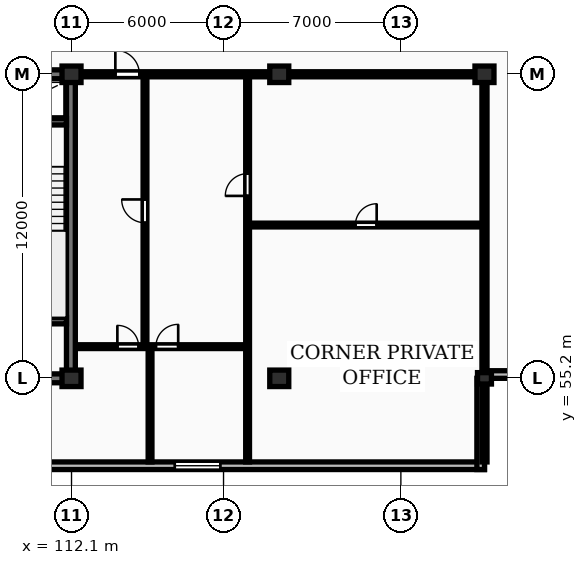
"""IFC4 building model, lengths in metres.
Left out: names, types, materials, properties, quantities, classifications, styles, units other than length and angle.
Written with IfcOpenShell. Run it as: python <this file> out.ifc"""

import sys

from ifc_helpers import new_model, si_unit, direction, frame, frame_2d, origin, origin_2d, place, context, subcontext, project, spatial, rectangle, extrude, element, fill, save


model = new_model("IFC4")
c1 = context("Model", 3, precision=1e-05, world=origin(), true_north=direction((0.0, 1.0)))
c2 = subcontext(c1, "Body", "Model", "MODEL_VIEW")
j1 = project(units=[si_unit("LENGTHUNIT", "METRE"), si_unit("PLANEANGLEUNIT", "RADIAN")], contexts=[c1])
p1 = place(None, origin())
s1 = spatial("IfcSite", under=j1, at=p1, CompositionType="ELEMENT")
p2 = place(p1, origin())
s2 = spatial("IfcBuilding", under=s1, at=p2, CompositionType="ELEMENT")
p3 = place(p2, frame((0.0, 0.0, 242.45)))
s3 = spatial("IfcBuildingStorey", under=s2, at=p3, CompositionType="ELEMENT", Elevation=242.45)
for number, where, z_axis, x_axis in (
    (1, (112.1, 55.2, 0.0), (0.0, 0.0, 1.0), (1.0, 0.0, 0.0)),
    (2, (112.1, 67.2, 0.0), (0.0, 0.0, 1.0), (1.0, 0.0, 0.0)),
    (3, (120.3, 55.2, 0.0), (0.0, 0.0, 1.0), (1.0, 0.0, 0.0)),
    (4, (120.3, 67.2, 0.0), (0.0, 0.0, 1.0), (1.0, 0.0, 0.0)),
):
    element("IfcColumn", number, at=place(p3, frame(where, z_axis=z_axis, x_axis=x_axis)), inside=s3, PredefinedType="COLUMN", context=c2, shape_type="SweptSolid", body=[
        extrude(rectangle(XDim=0.75, YDim=0.65, at=origin_2d()), origin(), (0.0, 0.0, 1.0), 3.45),
    ])
p4 = place(p3, frame((128.4, 55.2, 0.0), z_axis=(0.0, 0.0, 1.0), x_axis=(1.0, 0.0, 0.0)))
e5 = element("IfcColumn", 5, at=p4, inside=s3, PredefinedType="PILASTER", context=c2, shape_type="SweptSolid", body=[
    extrude(rectangle(XDim=0.55, YDim=0.45, at=origin_2d()), origin(), (0.0, 0.0, 1.0), 3.45),
])
p5 = place(p3, frame((128.4, 67.2, 0.0), z_axis=(0.0, 0.0, 1.0), x_axis=(1.0, 0.0, 0.0)))
e6 = element("IfcColumn", 6, at=p5, inside=s3, PredefinedType="COLUMN", context=c2, shape_type="SweptSolid", body=[
    extrude(rectangle(XDim=0.75, YDim=0.65, at=origin_2d()), origin(), (0.0, 0.0, 1.0), 3.45),
])
p6 = place(p3, frame((59.8, 51.75, 0.0), z_axis=(0.0, 0.0, 1.0), x_axis=(1.0, 0.0, 0.0)))
e7 = element("IfcWall", 7, at=p6, inside=s3, PredefinedType="STANDARD", context=c2, shape_type="SweptSolid", body=[
    extrude(rectangle(XDim=68.6, YDim=0.3, at=frame_2d((34.3, 0.0))), origin(), (0.0, 0.0, 1.0), 3.17),
])
p7 = place(p6, frame((13.025, 0.0, 0.85)))
e8 = element("IfcOpeningElement", 8, at=p7, cuts=e7, PredefinedType="OPENING", context=c2, shape_type="SweptSolid", body=[
    extrude(rectangle(XDim=1.8, YDim=1.8, at=frame_2d((0.9, 0.9))), frame((0.0, 0.16, 0.0), z_axis=(0.0, -1.0, 0.0), x_axis=(1.0, 0.0, 0.0)), (0.0, 0.0, 1.0), 0.32),
])
p8 = place(p6, frame((56.375, 0.0, 0.85)))
e9 = element("IfcOpeningElement", 9, at=p8, cuts=e7, PredefinedType="OPENING", context=c2, shape_type="SweptSolid", body=[
    extrude(rectangle(XDim=1.8, YDim=1.8, at=frame_2d((0.9, 0.9))), frame((0.0, 0.16, 0.0), z_axis=(0.0, -1.0, 0.0), x_axis=(1.0, 0.0, 0.0)), (0.0, 0.0, 1.0), 0.32),
])
p9 = place(p3, frame((128.25, 51.6, 0.0), z_axis=(0.0, 0.0, 1.0), x_axis=(0.0, 1.0, 0.0)))
e10 = element("IfcWall", 10, at=p9, inside=s3, PredefinedType="STANDARD", context=c2, shape_type="SweptSolid", body=[
    extrude(rectangle(XDim=3.6, YDim=0.3, at=frame_2d((1.8, 0.0))), origin(), (0.0, 0.0, 1.0), 3.17),
])
p10 = place(p3, frame((128.4, 55.35, 0.0), z_axis=(0.0, 0.0, 1.0), x_axis=(1.0, 0.0, 0.0)))
e11 = element("IfcWall", 11, at=p10, inside=s3, PredefinedType="STANDARD", context=c2, shape_type="SweptSolid", body=[
    extrude(rectangle(XDim=3.6, YDim=0.3, at=frame_2d((1.8, 0.0))), origin(), (0.0, 0.0, 1.0), 3.17),
])
p11 = place(p3, frame((75.95, 55.2, 0.0), z_axis=(0.0, 0.0, 1.0), x_axis=(1.0, 0.0, 0.0)))
e12 = element("IfcWall", 12, at=p11, inside=s3, PredefinedType="SHEAR", context=c2, shape_type="SweptSolid", body=[
    extrude(rectangle(XDim=36.3, YDim=0.35, at=frame_2d((18.15, 0.0))), origin(), (0.0, 0.0, 1.0), 3.45),
])
p12 = place(p3, frame((112.075, 55.375, 0.0), z_axis=(0.0, 0.0, 1.0), x_axis=(0.0, 1.0, 0.0)))
e13 = element("IfcWall", 13, at=p12, inside=s3, PredefinedType="SHEAR", context=c2, shape_type="SweptSolid", body=[
    extrude(rectangle(XDim=11.65, YDim=0.35, at=frame_2d((5.825, 0.0))), origin(), (0.0, 0.0, 1.0), 3.45),
])
p13 = place(p3, frame((75.95, 67.2, 0.0), z_axis=(0.0, 0.0, 1.0), x_axis=(1.0, 0.0, 0.0)))
e14 = element("IfcWall", 14, at=p13, inside=s3, PredefinedType="SHEAR", context=c2, shape_type="SweptSolid", body=[
    extrude(rectangle(XDim=36.3, YDim=0.35, at=frame_2d((18.15, 0.0))), origin(), (0.0, 0.0, 1.0), 3.45),
])
p14 = place(p13, frame((5.25, 0.0, 0.0)))
e15 = element("IfcOpeningElement", 15, at=p14, cuts=e14, PredefinedType="OPENING", context=c2, shape_type="SweptSolid", body=[
    extrude(rectangle(XDim=1.0, YDim=2.15, at=frame_2d((0.5, 1.075))), frame((0.0, 0.185, 0.0), z_axis=(0.0, -1.0, 0.0), x_axis=(1.0, 0.0, 0.0)), (0.0, 0.0, 1.0), 0.37),
])
p15 = place(p13, frame((21.6, 0.0, 0.0)))
e16 = element("IfcOpeningElement", 16, at=p15, cuts=e14, PredefinedType="OPENING", context=c2, shape_type="SweptSolid", body=[
    extrude(rectangle(XDim=1.5, YDim=2.2, at=frame_2d((0.75, 1.1))), frame((0.0, 0.185, 0.0), z_axis=(0.0, -1.0, 0.0), x_axis=(1.0, 0.0, 0.0)), (0.0, 0.0, 1.0), 0.37),
])
p16 = place(p13, frame((30.45, 0.0, 0.0)))
e17 = element("IfcOpeningElement", 17, at=p16, cuts=e14, PredefinedType="OPENING", context=c2, shape_type="SweptSolid", body=[
    extrude(rectangle(XDim=1.0, YDim=2.15, at=frame_2d((0.5, 1.075))), frame((0.0, 0.185, 0.0), z_axis=(0.0, -1.0, 0.0), x_axis=(1.0, 0.0, 0.0)), (0.0, 0.0, 1.0), 0.37),
])
for number, where, z_axis, x_axis in (
    (18, (108.66, 57.475, 0.0), (0.0, 0.0, 1.0), (1.0, 0.0, 0.0)),
    (19, (108.66, 65.325, 0.0), (0.0, 0.0, 1.0), (1.0, 0.0, 0.0)),
):
    element("IfcWall", number, at=place(p3, frame(where, z_axis=z_axis, x_axis=x_axis)), inside=s3, PredefinedType="SHEAR", context=c2, shape_type="SweptSolid", body=[
        extrude(rectangle(XDim=3.24, YDim=0.25, at=frame_2d((1.62, 0.0))), origin(), (0.0, 0.0, 1.0), 3.45),
    ])
p17 = place(p3, frame((128.4, 51.9, 0.0), z_axis=(0.0, 0.0, 1.0), x_axis=(0.0, 1.0, 0.0)))
e20 = element("IfcWall", 20, at=p17, inside=s3, PredefinedType="PARTITIONING", context=c2, shape_type="SweptSolid", body=[
    extrude(rectangle(XDim=15.3, YDim=0.2, at=frame_2d((7.65, 0.0))), origin(), (0.0, 0.0, 1.0), 2.477),
])
p18 = place(p3, frame((119.05, 61.25, 0.0), z_axis=(0.0, 0.0, 1.0), x_axis=(1.0, 0.0, 0.0)))
e21 = element("IfcWall", 21, at=p18, inside=s3, PredefinedType="PARTITIONING", context=c2, shape_type="SweptSolid", body=[
    extrude(rectangle(XDim=9.35, YDim=0.15, at=frame_2d((4.675, 0.0))), origin(), (0.0, 0.0, 1.0), 3.17),
])
p19 = place(p18, frame((4.255, 0.0, 0.0)))
e22 = element("IfcOpeningElement", 22, at=p19, cuts=e21, PredefinedType="OPENING", context=c2, shape_type="SweptSolid", body=[
    extrude(rectangle(XDim=0.84, YDim=2.04, at=frame_2d((0.42, 1.02))), frame((0.0, 0.085, 0.0), z_axis=(0.0, -1.0, 0.0), x_axis=(1.0, 0.0, 0.0)), (0.0, 0.0, 1.0), 0.17),
])
p20 = place(p3, frame((119.05, 51.9, 0.0), z_axis=(0.0, 0.0, 1.0), x_axis=(0.0, 1.0, 0.0)))
e23 = element("IfcWall", 23, at=p20, inside=s3, PredefinedType="PARTITIONING", context=c2, shape_type="SweptSolid", body=[
    extrude(rectangle(XDim=15.25, YDim=0.15, at=frame_2d((7.625, 0.0))), origin(), (0.0, 0.0, 1.0), 3.17),
])
p21 = place(p20, frame((10.5, 0.0, 0.0)))
e24 = element("IfcOpeningElement", 24, at=p21, cuts=e23, PredefinedType="OPENING", context=c2, shape_type="SweptSolid", body=[
    extrude(rectangle(XDim=0.88, YDim=2.06, at=frame_2d((0.44, 1.03))), frame((0.0, 0.085, 0.0), z_axis=(0.0, -1.0, 0.0), x_axis=(1.0, 0.0, 0.0)), (0.0, 0.0, 1.0), 0.17),
])
p22 = place(p3, frame((115.0, 56.45, 0.0), z_axis=(0.0, 0.0, 1.0), x_axis=(0.0, 1.0, 0.0)))
e25 = element("IfcWall", 25, at=p22, inside=s3, PredefinedType="PARTITIONING", context=c2, shape_type="SweptSolid", body=[
    extrude(rectangle(XDim=10.7, YDim=0.15, at=frame_2d((5.35, 0.0))), origin(), (0.0, 0.0, 1.0), 3.17),
])
p23 = place(p22, frame((4.89, 0.0, 0.0)))
e26 = element("IfcOpeningElement", 26, at=p23, cuts=e25, PredefinedType="OPENING", context=c2, shape_type="SweptSolid", body=[
    extrude(rectangle(XDim=0.92, YDim=2.08, at=frame_2d((0.46, 1.04))), frame((0.0, 0.085, 0.0), z_axis=(0.0, -1.0, 0.0), x_axis=(1.0, 0.0, 0.0)), (0.0, 0.0, 1.0), 0.17),
])
p24 = place(p3, frame((115.2, 51.9, 0.0), z_axis=(0.0, 0.0, 1.0), x_axis=(0.0, 1.0, 0.0)))
e27 = element("IfcWall", 27, at=p24, inside=s3, PredefinedType="PARTITIONING", context=c2, shape_type="SweptSolid", body=[
    extrude(rectangle(XDim=4.55, YDim=0.15, at=frame_2d((2.275, 0.0))), origin(), (0.0, 0.0, 1.0), 3.17),
])
p25 = place(p3, frame((112.27, 56.45, 0.0), z_axis=(0.0, 0.0, 1.0), x_axis=(1.0, 0.0, 0.0)))
e28 = element("IfcWall", 28, at=p25, inside=s3, PredefinedType="PARTITIONING", context=c2, shape_type="SweptSolid", body=[
    extrude(rectangle(XDim=6.76, YDim=0.15, at=frame_2d((3.38, 0.0))), origin(), (0.0, 0.0, 1.0), 3.17),
])
p26 = place(p25, frame((1.64, 0.0, 0.0)))
e29 = element("IfcOpeningElement", 29, at=p26, cuts=e28, PredefinedType="OPENING", context=c2, shape_type="SweptSolid", body=[
    extrude(rectangle(XDim=0.84, YDim=2.04, at=frame_2d((0.42, 1.02))), frame((0.0, 0.085, 0.0), z_axis=(0.0, -1.0, 0.0), x_axis=(1.0, 0.0, 0.0)), (0.0, 0.0, 1.0), 0.17),
])
p27 = place(p25, frame((3.16, 0.0, 0.0)))
e30 = element("IfcOpeningElement", 30, at=p27, cuts=e28, PredefinedType="OPENING", context=c2, shape_type="SweptSolid", body=[
    extrude(rectangle(XDim=0.88, YDim=2.06, at=frame_2d((0.44, 1.03))), frame((0.0, 0.085, 0.0), z_axis=(0.0, -1.0, 0.0), x_axis=(1.0, 0.0, 0.0)), (0.0, 0.0, 1.0), 0.17),
])
p28 = place(p3, frame((112.25, 67.2, 0.0), z_axis=(0.0, 0.0, 1.0), x_axis=(1.0, 0.0, 0.0)))
e31 = element("IfcWall", 31, at=p28, inside=s3, PredefinedType="PARTITIONING", context=c2, shape_type="SweptSolid", body=[
    extrude(rectangle(XDim=16.15, YDim=0.2, at=frame_2d((8.075, 0.0))), origin(), (0.0, 0.0, 1.0), 2.633),
])
p29 = place(p28, frame((1.58, 0.0, 0.0)))
e32 = element("IfcOpeningElement", 32, at=p29, cuts=e31, PredefinedType="OPENING", context=c2, shape_type="SweptSolid", body=[
    extrude(rectangle(XDim=0.95, YDim=2.15, at=frame_2d((0.475, 1.075))), frame((0.0, 0.11, 0.0), z_axis=(0.0, -1.0, 0.0), x_axis=(1.0, 0.0, 0.0)), (0.0, 0.0, 1.0), 0.22),
])
p30 = place(p8, origin())
e33 = element("IfcWindow", 33, at=p30, inside=s3, PartitioningType="SINGLE_PANEL", PredefinedType="WINDOW", context=c2, shape_type="SweptSolid", body=[
    extrude(rectangle(XDim=1.8, YDim=1.8, at=frame_2d((0.9, 0.9))), frame((0.0, 0.03, 0.0), z_axis=(0.0, -1.0, 0.0), x_axis=(1.0, 0.0, 0.0)), (0.0, 0.0, 1.0), 0.06),
])
fill(e9, e33)
p31 = place(p19, origin())
e34 = element("IfcDoor", 34, at=p31, inside=s3, OperationType="SINGLE_SWING_RIGHT", PredefinedType="DOOR", context=c2, shape_type="SweptSolid", body=[
    extrude(rectangle(XDim=0.84, YDim=2.04, at=frame_2d((0.42, 1.02))), frame((0.0, 0.025, 0.0), z_axis=(0.0, -1.0, 0.0), x_axis=(1.0, 0.0, 0.0)), (0.0, 0.0, 1.0), 0.05),
])
fill(e22, e34)
p32 = place(p21, origin())
e35 = element("IfcDoor", 35, at=p32, inside=s3, OperationType="SINGLE_SWING_LEFT", PredefinedType="DOOR", context=c2, shape_type="SweptSolid", body=[
    extrude(rectangle(XDim=0.88, YDim=2.06, at=frame_2d((0.44, 1.03))), frame((0.0, 0.025, 0.0), z_axis=(0.0, -1.0, 0.0), x_axis=(1.0, 0.0, 0.0)), (0.0, 0.0, 1.0), 0.05),
])
fill(e24, e35)
p33 = place(p23, origin())
e36 = element("IfcDoor", 36, at=p33, inside=s3, OperationType="SINGLE_SWING_RIGHT", PredefinedType="DOOR", context=c2, shape_type="SweptSolid", body=[
    extrude(rectangle(XDim=0.92, YDim=2.08, at=frame_2d((0.46, 1.04))), frame((0.0, 0.025, 0.0), z_axis=(0.0, -1.0, 0.0), x_axis=(1.0, 0.0, 0.0)), (0.0, 0.0, 1.0), 0.05),
])
fill(e26, e36)
p34 = place(p26, origin())
e37 = element("IfcDoor", 37, at=p34, inside=s3, OperationType="SINGLE_SWING_LEFT", PredefinedType="DOOR", context=c2, shape_type="SweptSolid", body=[
    extrude(rectangle(XDim=0.84, YDim=2.04, at=frame_2d((0.42, 1.02))), frame((0.0, 0.025, 0.0), z_axis=(0.0, -1.0, 0.0), x_axis=(1.0, 0.0, 0.0)), (0.0, 0.0, 1.0), 0.05),
])
fill(e29, e37)
p35 = place(p27, origin())
e38 = element("IfcDoor", 38, at=p35, inside=s3, OperationType="SINGLE_SWING_RIGHT", PredefinedType="DOOR", context=c2, shape_type="SweptSolid", body=[
    extrude(rectangle(XDim=0.88, YDim=2.06, at=frame_2d((0.44, 1.03))), frame((0.0, 0.025, 0.0), z_axis=(0.0, -1.0, 0.0), x_axis=(1.0, 0.0, 0.0)), (0.0, 0.0, 1.0), 0.05),
])
fill(e30, e38)
p36 = place(p29, origin())
e39 = element("IfcDoor", 39, at=p36, inside=s3, OperationType="SINGLE_SWING_LEFT", PredefinedType="DOOR", context=c2, shape_type="SweptSolid", body=[
    extrude(rectangle(XDim=0.95, YDim=2.15, at=frame_2d((0.475, 1.075))), frame((0.0, 0.025, 0.0), z_axis=(0.0, -1.0, 0.0), x_axis=(1.0, 0.0, 0.0)), (0.0, 0.0, 1.0), 0.05),
])
fill(e32, e39)
save(model, sys.argv[1])
